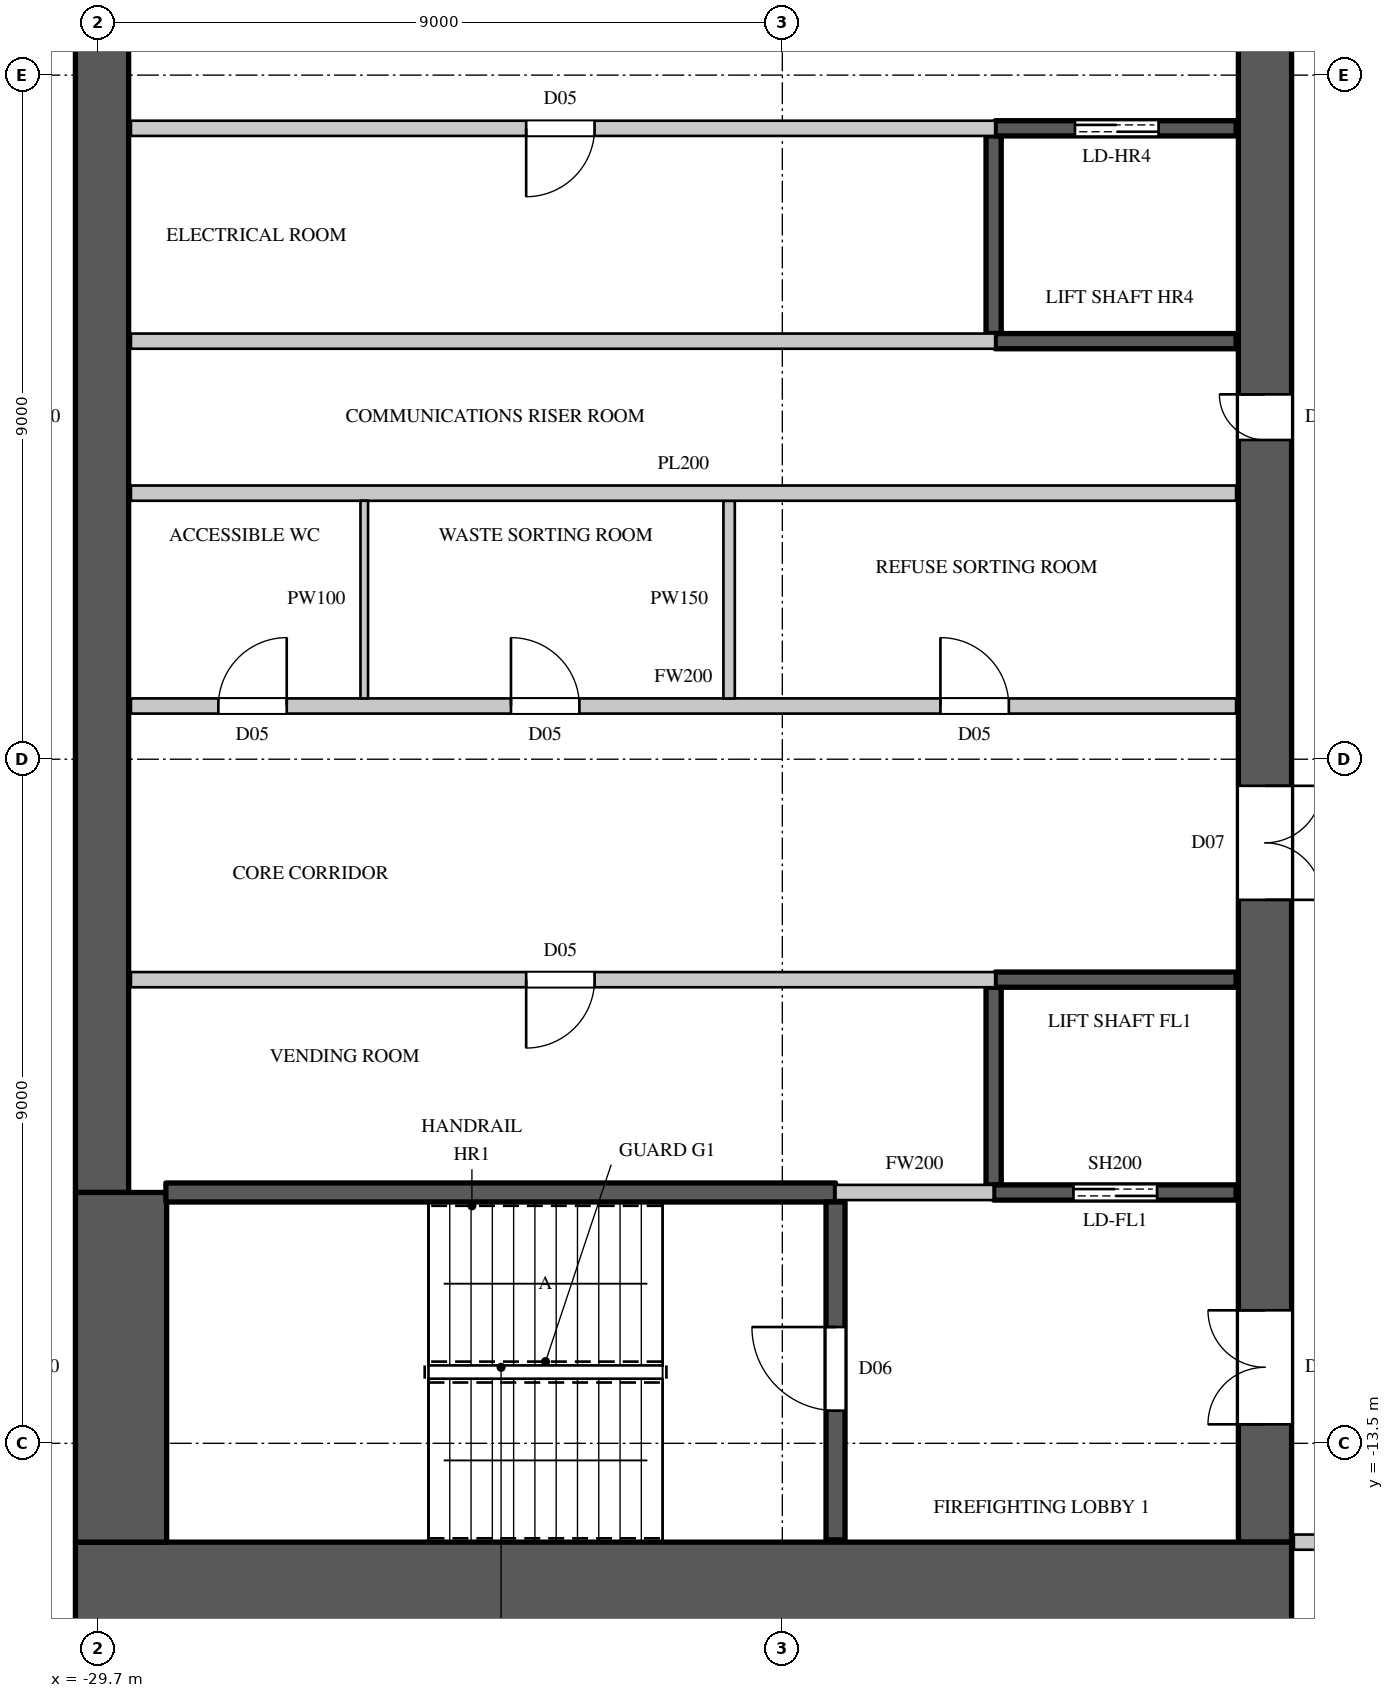
"""IFC4 building model, lengths in metres.
Left out: names, types, materials, properties, quantities, classifications, styles, units other than length and angle.
Written with IfcOpenShell. Run it as: python <this file> out.ifc"""

import sys

from ifc_helpers import new_model, si_unit, direction, frame, frame_2d, origin, place, context, subcontext, project, spatial, rectangle, extrude, element, fill, save


model = new_model("IFC4")
c1 = context("Model", 3, precision=1e-05, world=origin(), true_north=direction((0.0, 1.0)))
c2 = subcontext(c1, "Body", "Model", "MODEL_VIEW")
j1 = project(units=[si_unit("LENGTHUNIT", "METRE"), si_unit("PLANEANGLEUNIT", "RADIAN")], contexts=[c1])
p1 = place(None, origin())
s1 = spatial("IfcSite", under=j1, at=p1, CompositionType="ELEMENT")
p2 = place(p1, origin())
s2 = spatial("IfcBuilding", under=s1, at=p2, CompositionType="ELEMENT")
p3 = place(p2, frame((0.0, 0.0, 288.5)))
s3 = spatial("IfcBuildingStorey", under=s2, at=p3, CompositionType="ELEMENT", Elevation=288.5)
p4 = place(p3, frame((-30.0, -15.4, 0.0), z_axis=(0.0, 0.0, 1.0), x_axis=(1.0, 0.0, 0.0)))
e1 = element("IfcWall", 1, at=p4, inside=s3, PredefinedType="SHEAR", context=c2, shape_type="SweptSolid", body=[
    extrude(rectangle(XDim=16.0, YDim=1.2, at=frame_2d((8.0, 0.0))), origin(), (0.0, 0.0, 1.0), 4.1),
])
p5 = place(p3, frame((-14.35, -14.8, 0.0), z_axis=(0.0, 0.0, 1.0), x_axis=(0.0, 1.0, 0.0)))
e2 = element("IfcWall", 2, at=p5, inside=s3, PredefinedType="SHEAR", context=c2, shape_type="SweptSolid", body=[
    extrude(rectangle(XDim=29.6, YDim=0.7, at=frame_2d((14.8, 0.0))), origin(), (0.0, 0.0, 1.0), 4.1),
])
p6 = place(p5, frame((1.55, 0.0, 0.0)))
e3 = element("IfcOpeningElement", 3, at=p6, cuts=e2, PredefinedType="OPENING", context=c2, shape_type="SweptSolid", body=[
    extrude(rectangle(XDim=1.5, YDim=2.4, at=frame_2d((0.75, 1.2))), frame((0.0, 0.36, 0.0), z_axis=(0.0, -1.0, 0.0), x_axis=(1.0, 0.0, 0.0)), (0.0, 0.0, 1.0), 0.72),
])
p7 = place(p5, frame((26.55, 0.0, 0.0)))
e4 = element("IfcOpeningElement", 4, at=p7, cuts=e2, PredefinedType="OPENING", context=c2, shape_type="SweptSolid", body=[
    extrude(rectangle(XDim=1.5, YDim=2.4, at=frame_2d((0.75, 1.2))), frame((0.0, 0.36, 0.0), z_axis=(0.0, -1.0, 0.0), x_axis=(1.0, 0.0, 0.0)), (0.0, 0.0, 1.0), 0.72),
])
p8 = place(p5, frame((8.45, 0.0, 0.0)))
e5 = element("IfcOpeningElement", 5, at=p8, cuts=e2, PredefinedType="OPENING", context=c2, shape_type="SweptSolid", body=[
    extrude(rectangle(XDim=1.5, YDim=2.4, at=frame_2d((0.75, 1.2))), frame((0.0, 0.36, 0.0), z_axis=(0.0, -1.0, 0.0), x_axis=(1.0, 0.0, 0.0)), (0.0, 0.0, 1.0), 0.72),
])
p9 = place(p5, frame((19.65, 0.0, 0.0)))
e6 = element("IfcOpeningElement", 6, at=p9, cuts=e2, PredefinedType="OPENING", context=c2, shape_type="SweptSolid", body=[
    extrude(rectangle(XDim=1.5, YDim=2.4, at=frame_2d((0.75, 1.2))), frame((0.0, 0.36, 0.0), z_axis=(0.0, -1.0, 0.0), x_axis=(1.0, 0.0, 0.0)), (0.0, 0.0, 1.0), 0.72),
])
p10 = place(p5, frame((14.5, 0.0, 0.0)))
e7 = element("IfcOpeningElement", 7, at=p10, cuts=e2, PredefinedType="OPENING", context=c2, shape_type="SweptSolid", body=[
    extrude(rectangle(XDim=0.6, YDim=2.0, at=frame_2d((0.3, 1.0))), frame((0.0, 0.36, 0.0), z_axis=(0.0, -1.0, 0.0), x_axis=(1.0, 0.0, 0.0)), (0.0, 0.0, 1.0), 0.72),
])
p11 = place(p3, frame((-29.65, -10.2, 0.0), z_axis=(0.0, 0.0, 1.0), x_axis=(0.0, 1.0, 0.0)))
e8 = element("IfcWall", 8, at=p11, inside=s3, PredefinedType="SHEAR", context=c2, shape_type="SweptSolid", body=[
    extrude(rectangle(XDim=20.4, YDim=0.7, at=frame_2d((10.2, 0.0))), origin(), (0.0, 0.0, 1.0), 4.1),
])
p12 = place(p3, frame((-29.4, -14.8, 0.0), z_axis=(0.0, 0.0, 1.0), x_axis=(0.0, 1.0, 0.0)))
e9 = element("IfcWall", 9, at=p12, inside=s3, PredefinedType="SHEAR", context=c2, shape_type="SweptSolid", body=[
    extrude(rectangle(XDim=4.6, YDim=1.2, at=frame_2d((2.3, 0.0))), origin(), (0.0, 0.0, 1.0), 4.1),
])
p13 = place(p3, frame((-29.27, -7.4, 0.0), z_axis=(0.0, 0.0, 1.0), x_axis=(1.0, 0.0, 0.0)))
e10 = element("IfcWall", 10, at=p13, inside=s3, PredefinedType="PARTITIONING", context=c2, shape_type="SweptSolid", body=[
    extrude(rectangle(XDim=11.37, YDim=0.2, at=frame_2d((5.685, 0.0))), origin(), (0.0, 0.0, 1.0), 3.8),
])
p14 = place(p13, frame((5.2, 0.0, 0.0)))
e11 = element("IfcOpeningElement", 11, at=p14, cuts=e10, PredefinedType="OPENING", context=c2, shape_type="SweptSolid", body=[
    extrude(rectangle(XDim=0.9, YDim=2.2, at=frame_2d((0.45, 1.1))), frame((0.0, 0.11, 0.0), z_axis=(0.0, -1.0, 0.0), x_axis=(1.0, 0.0, 0.0)), (0.0, 0.0, 1.0), 0.22),
])
p15 = place(p3, frame((-29.27, -3.8, 0.0), z_axis=(0.0, 0.0, 1.0), x_axis=(1.0, 0.0, 0.0)))
e12 = element("IfcWall", 12, at=p15, inside=s3, PredefinedType="PARTITIONING", context=c2, shape_type="SweptSolid", body=[
    extrude(rectangle(XDim=14.54, YDim=0.2, at=frame_2d((7.27, 0.0))), origin(), (0.0, 0.0, 1.0), 3.8),
])
p16 = place(p15, frame((1.15, 0.0, 0.0)))
e13 = element("IfcOpeningElement", 13, at=p16, cuts=e12, PredefinedType="OPENING", context=c2, shape_type="SweptSolid", body=[
    extrude(rectangle(XDim=0.9, YDim=2.2, at=frame_2d((0.45, 1.1))), frame((0.0, 0.11, 0.0), z_axis=(0.0, -1.0, 0.0), x_axis=(1.0, 0.0, 0.0)), (0.0, 0.0, 1.0), 0.22),
])
p17 = place(p15, frame((5.0, 0.0, 0.0)))
e14 = element("IfcOpeningElement", 14, at=p17, cuts=e12, PredefinedType="OPENING", context=c2, shape_type="SweptSolid", body=[
    extrude(rectangle(XDim=0.9, YDim=2.2, at=frame_2d((0.45, 1.1))), frame((0.0, 0.11, 0.0), z_axis=(0.0, -1.0, 0.0), x_axis=(1.0, 0.0, 0.0)), (0.0, 0.0, 1.0), 0.22),
])
p18 = place(p15, frame((10.65, 0.0, 0.0)))
e15 = element("IfcOpeningElement", 15, at=p18, cuts=e12, PredefinedType="OPENING", context=c2, shape_type="SweptSolid", body=[
    extrude(rectangle(XDim=0.9, YDim=2.2, at=frame_2d((0.45, 1.1))), frame((0.0, 0.11, 0.0), z_axis=(0.0, -1.0, 0.0), x_axis=(1.0, 0.0, 0.0)), (0.0, 0.0, 1.0), 0.22),
])
p19 = place(p3, frame((-20.0, -10.2, 0.0), z_axis=(0.0, 0.0, 1.0), x_axis=(1.0, 0.0, 0.0)))
e16 = element("IfcWall", 16, at=p19, inside=s3, PredefinedType="PARTITIONING", context=c2, shape_type="SweptSolid", body=[
    extrude(rectangle(XDim=2.08, YDim=0.2, at=frame_2d((1.04, 0.0))), origin(), (0.0, 0.0, 1.0), 3.8),
])
p20 = place(p3, frame((-13.97, -14.8, 0.0), z_axis=(0.0, 0.0, 1.0), x_axis=(1.0, 0.0, 0.0)))
e17 = element("IfcWall", 17, at=p20, inside=s3, PredefinedType="PARTITIONING", context=c2, shape_type="SweptSolid", body=[
    extrude(rectangle(XDim=2.87, YDim=0.2, at=frame_2d((1.435, 0.0))), origin(), (0.0, 0.0, 1.0), 3.8),
])
p21 = place(p3, frame((-21.4, -3.7, 0.0), z_axis=(0.0, 0.0, 1.0), x_axis=(0.0, 1.0, 0.0)))
e18 = element("IfcWall", 18, at=p21, inside=s3, PredefinedType="PARTITIONING", context=c2, shape_type="SweptSolid", body=[
    extrude(rectangle(XDim=2.6, YDim=0.15, at=frame_2d((1.3, 0.0))), origin(), (0.0, 0.0, 1.0), 3.8),
])
p22 = place(p3, frame((-29.27, -1.0, 0.0), z_axis=(0.0, 0.0, 1.0), x_axis=(1.0, 0.0, 0.0)))
e19 = element("IfcWall", 19, at=p22, inside=s3, PredefinedType="PARTITIONING", context=c2, shape_type="SweptSolid", body=[
    extrude(rectangle(XDim=14.54, YDim=0.2, at=frame_2d((7.27, 0.0))), origin(), (0.0, 0.0, 1.0), 3.8),
])
p23 = place(p3, frame((-29.27, 1.0, 0.0), z_axis=(0.0, 0.0, 1.0), x_axis=(1.0, 0.0, 0.0)))
e20 = element("IfcWall", 20, at=p23, inside=s3, PredefinedType="PARTITIONING", context=c2, shape_type="SweptSolid", body=[
    extrude(rectangle(XDim=11.37, YDim=0.2, at=frame_2d((5.685, 0.0))), origin(), (0.0, 0.0, 1.0), 3.8),
])
p24 = place(p3, frame((-29.27, 3.8, 0.0), z_axis=(0.0, 0.0, 1.0), x_axis=(1.0, 0.0, 0.0)))
e21 = element("IfcWall", 21, at=p24, inside=s3, PredefinedType="PARTITIONING", context=c2, shape_type="SweptSolid", body=[
    extrude(rectangle(XDim=11.37, YDim=0.2, at=frame_2d((5.685, 0.0))), origin(), (0.0, 0.0, 1.0), 3.8),
])
p25 = place(p24, frame((5.2, 0.0, 0.0)))
e22 = element("IfcOpeningElement", 22, at=p25, cuts=e21, PredefinedType="OPENING", context=c2, shape_type="SweptSolid", body=[
    extrude(rectangle(XDim=0.9, YDim=2.2, at=frame_2d((0.45, 1.1))), frame((0.0, 0.11, 0.0), z_axis=(0.0, -1.0, 0.0), x_axis=(1.0, 0.0, 0.0)), (0.0, 0.0, 1.0), 0.22),
])
p26 = place(p3, frame((-17.92, -10.1, 0.0), z_axis=(0.0, 0.0, 1.0), x_axis=(0.0, 1.0, 0.0)))
e23 = element("IfcWall", 23, at=p26, inside=s3, PredefinedType="SHEAR", context=c2, shape_type="SweptSolid", body=[
    extrude(rectangle(XDim=2.6, YDim=0.2, at=frame_2d((1.3, 0.0))), origin(), (0.0, 0.0, 1.0), 3.8),
])
p27 = place(p3, frame((-17.92, -10.2, 0.0), z_axis=(0.0, 0.0, 1.0), x_axis=(1.0, 0.0, 0.0)))
e24 = element("IfcWall", 24, at=p27, inside=s3, PredefinedType="SHEAR", context=c2, shape_type="SweptSolid", body=[
    extrude(rectangle(XDim=3.19, YDim=0.2, at=frame_2d((1.595, 0.0))), origin(), (0.0, 0.0, 1.0), 3.8),
])
p28 = place(p27, frame((1.05, 0.0, 0.0)))
e25 = element("IfcOpeningElement", 25, at=p28, cuts=e24, PredefinedType="OPENING", context=c2, shape_type="SweptSolid", body=[
    extrude(rectangle(XDim=1.1, YDim=2.2, at=frame_2d((0.55, 1.1))), frame((0.0, 0.11, 0.0), z_axis=(0.0, -1.0, 0.0), x_axis=(1.0, 0.0, 0.0)), (0.0, 0.0, 1.0), 0.22),
])
p29 = place(p3, frame((-17.9, -7.4, 0.0), z_axis=(0.0, 0.0, 1.0), x_axis=(1.0, 0.0, 0.0)))
e26 = element("IfcWall", 26, at=p29, inside=s3, PredefinedType="SHEAR", context=c2, shape_type="SweptSolid", body=[
    extrude(rectangle(XDim=3.17, YDim=0.2, at=frame_2d((1.585, 0.0))), origin(), (0.0, 0.0, 1.0), 3.8),
])
p30 = place(p3, frame((-17.92, 1.1, 0.0), z_axis=(0.0, 0.0, 1.0), x_axis=(0.0, 1.0, 0.0)))
e27 = element("IfcWall", 27, at=p30, inside=s3, PredefinedType="SHEAR", context=c2, shape_type="SweptSolid", body=[
    extrude(rectangle(XDim=2.6, YDim=0.2, at=frame_2d((1.3, 0.0))), origin(), (0.0, 0.0, 1.0), 3.8),
])
p31 = place(p3, frame((-17.9, 1.0, 0.0), z_axis=(0.0, 0.0, 1.0), x_axis=(1.0, 0.0, 0.0)))
e28 = element("IfcWall", 28, at=p31, inside=s3, PredefinedType="SHEAR", context=c2, shape_type="SweptSolid", body=[
    extrude(rectangle(XDim=3.17, YDim=0.2, at=frame_2d((1.585, 0.0))), origin(), (0.0, 0.0, 1.0), 3.8),
])
p32 = place(p3, frame((-17.9, 3.8, 0.0), z_axis=(0.0, 0.0, 1.0), x_axis=(1.0, 0.0, 0.0)))
e29 = element("IfcWall", 29, at=p32, inside=s3, PredefinedType="SHEAR", context=c2, shape_type="SweptSolid", body=[
    extrude(rectangle(XDim=3.17, YDim=0.2, at=frame_2d((1.585, 0.0))), origin(), (0.0, 0.0, 1.0), 3.8),
])
p33 = place(p32, frame((1.05, 0.0, 0.0)))
e30 = element("IfcOpeningElement", 30, at=p33, cuts=e29, PredefinedType="OPENING", context=c2, shape_type="SweptSolid", body=[
    extrude(rectangle(XDim=1.1, YDim=2.2, at=frame_2d((0.55, 1.1))), frame((0.0, 0.11, 0.0), z_axis=(0.0, -1.0, 0.0), x_axis=(1.0, 0.0, 0.0)), (0.0, 0.0, 1.0), 0.22),
])
p34 = place(p3, frame((-28.81, -10.2, 0.0), z_axis=(0.0, 0.0, 1.0), x_axis=(1.0, 0.0, 0.0)))
e31 = element("IfcWall", 31, at=p34, inside=s3, PredefinedType="SHEAR", context=c2, shape_type="SweptSolid", body=[
    extrude(rectangle(XDim=8.81, YDim=0.25, at=frame_2d((4.405, 0.0))), origin(), (0.0, 0.0, 1.0), 3.8),
])
p35 = place(p3, frame((-20.0, -14.77, 0.0), z_axis=(0.0, 0.0, 1.0), x_axis=(0.0, 1.0, 0.0)))
e32 = element("IfcWall", 32, at=p35, inside=s3, PredefinedType="SHEAR", context=c2, shape_type="SweptSolid", body=[
    extrude(rectangle(XDim=4.445, YDim=0.25, at=frame_2d((2.223, 0.0))), origin(), (0.0, 0.0, 1.0), 3.8),
])
p36 = place(p35, frame((1.7, 0.0, 0.0)))
e33 = element("IfcOpeningElement", 33, at=p36, cuts=e32, PredefinedType="OPENING", context=c2, shape_type="SweptSolid", body=[
    extrude(rectangle(XDim=1.1, YDim=2.2, at=frame_2d((0.55, 1.1))), frame((0.0, 0.135, 0.0), z_axis=(0.0, -1.0, 0.0), x_axis=(1.0, 0.0, 0.0)), (0.0, 0.0, 1.0), 0.27),
])
p37 = place(p3, frame((-26.2, -3.7, 0.0), z_axis=(0.0, 0.0, 1.0), x_axis=(0.0, 1.0, 0.0)))
e34 = element("IfcWall", 34, at=p37, inside=s3, PredefinedType="PARTITIONING", context=c2, shape_type="SweptSolid", body=[
    extrude(rectangle(XDim=2.6, YDim=0.1, at=frame_2d((1.3, 0.0))), origin(), (0.0, 0.0, 1.0), 3.8),
])
p38 = place(p36, origin())
e35 = element("IfcDoor", 35, at=p38, inside=s3, OperationType="SINGLE_SWING_RIGHT", PredefinedType="DOOR", context=c2, shape_type="SweptSolid", body=[
    extrude(rectangle(XDim=1.1, YDim=2.2, at=frame_2d((0.55, 1.1))), frame((0.0, 0.025, 0.0), z_axis=(0.0, -1.0, 0.0), x_axis=(1.0, 0.0, 0.0)), (0.0, 0.0, 1.0), 0.05),
])
fill(e33, e35)
p39 = place(p14, origin())
e36 = element("IfcDoor", 36, at=p39, inside=s3, OperationType="SINGLE_SWING_RIGHT", PredefinedType="DOOR", context=c2, shape_type="SweptSolid", body=[
    extrude(rectangle(XDim=0.9, YDim=2.2, at=frame_2d((0.45, 1.1))), frame((0.0, 0.025, 0.0), z_axis=(0.0, -1.0, 0.0), x_axis=(1.0, 0.0, 0.0)), (0.0, 0.0, 1.0), 0.05),
])
fill(e11, e36)
p40 = place(p16, origin())
e37 = element("IfcDoor", 37, at=p40, inside=s3, OperationType="SINGLE_SWING_RIGHT", PredefinedType="DOOR", context=c2, shape_type="SweptSolid", body=[
    extrude(rectangle(XDim=0.9, YDim=2.2, at=frame_2d((0.45, 1.1))), frame((0.0, 0.025, 0.0), z_axis=(0.0, -1.0, 0.0), x_axis=(1.0, 0.0, 0.0)), (0.0, 0.0, 1.0), 0.05),
])
fill(e13, e37)
p41 = place(p17, origin())
e38 = element("IfcDoor", 38, at=p41, inside=s3, OperationType="SINGLE_SWING_LEFT", PredefinedType="DOOR", context=c2, shape_type="SweptSolid", body=[
    extrude(rectangle(XDim=0.9, YDim=2.2, at=frame_2d((0.45, 1.1))), frame((0.0, 0.025, 0.0), z_axis=(0.0, -1.0, 0.0), x_axis=(1.0, 0.0, 0.0)), (0.0, 0.0, 1.0), 0.05),
])
fill(e14, e38)
p42 = place(p18, origin())
e39 = element("IfcDoor", 39, at=p42, inside=s3, OperationType="SINGLE_SWING_LEFT", PredefinedType="DOOR", context=c2, shape_type="SweptSolid", body=[
    extrude(rectangle(XDim=0.9, YDim=2.2, at=frame_2d((0.45, 1.1))), frame((0.0, 0.025, 0.0), z_axis=(0.0, -1.0, 0.0), x_axis=(1.0, 0.0, 0.0)), (0.0, 0.0, 1.0), 0.05),
])
fill(e15, e39)
p43 = place(p25, origin())
e40 = element("IfcDoor", 40, at=p43, inside=s3, OperationType="SINGLE_SWING_RIGHT", PredefinedType="DOOR", context=c2, shape_type="SweptSolid", body=[
    extrude(rectangle(XDim=0.9, YDim=2.2, at=frame_2d((0.45, 1.1))), frame((0.0, 0.025, 0.0), z_axis=(0.0, -1.0, 0.0), x_axis=(1.0, 0.0, 0.0)), (0.0, 0.0, 1.0), 0.05),
])
fill(e22, e40)
p44 = place(p28, origin())
e41 = element("IfcDoor", 41, at=p44, inside=s3, OperationType="DOUBLE_DOOR_SLIDING", PredefinedType="DOOR", context=c2, shape_type="SweptSolid", body=[
    extrude(rectangle(XDim=1.1, YDim=2.2, at=frame_2d((0.55, 1.1))), frame((0.0, 0.025, 0.0), z_axis=(0.0, -1.0, 0.0), x_axis=(1.0, 0.0, 0.0)), (0.0, 0.0, 1.0), 0.05),
])
fill(e25, e41)
p45 = place(p33, origin())
e42 = element("IfcDoor", 42, at=p45, inside=s3, OperationType="DOUBLE_DOOR_SLIDING", PredefinedType="DOOR", context=c2, shape_type="SweptSolid", body=[
    extrude(rectangle(XDim=1.1, YDim=2.2, at=frame_2d((0.55, 1.1))), frame((0.0, 0.025, 0.0), z_axis=(0.0, -1.0, 0.0), x_axis=(1.0, 0.0, 0.0)), (0.0, 0.0, 1.0), 0.05),
])
fill(e30, e42)
p46 = place(p6, origin())
e43 = element("IfcDoor", 43, at=p46, inside=s3, OperationType="DOUBLE_DOOR_SINGLE_SWING", PredefinedType="DOOR", context=c2, shape_type="SweptSolid", body=[
    extrude(rectangle(XDim=1.5, YDim=2.4, at=frame_2d((0.75, 1.2))), frame((0.0, 0.345, 0.0), z_axis=(0.0, -1.0, 0.0), x_axis=(1.0, 0.0, 0.0)), (0.0, 0.0, 1.0), 0.05),
])
fill(e3, e43)
p47 = place(p8, origin())
e44 = element("IfcDoor", 44, at=p47, inside=s3, OperationType="DOUBLE_DOOR_SINGLE_SWING", PredefinedType="DOOR", context=c2, shape_type="SweptSolid", body=[
    extrude(rectangle(XDim=1.5, YDim=2.4, at=frame_2d((0.75, 1.2))), frame((0.0, -0.295, 0.0), z_axis=(0.0, -1.0, 0.0), x_axis=(1.0, 0.0, 0.0)), (0.0, 0.0, 1.0), 0.05),
])
fill(e5, e44)
p48 = place(p10, origin())
e45 = element("IfcDoor", 45, at=p48, inside=s3, OperationType="SINGLE_SWING_RIGHT", PredefinedType="DOOR", context=c2, shape_type="SweptSolid", body=[
    extrude(rectangle(XDim=0.6, YDim=2.0, at=frame_2d((0.3, 1.0))), frame((0.0, 0.345, 0.0), z_axis=(0.0, -1.0, 0.0), x_axis=(1.0, 0.0, 0.0)), (0.0, 0.0, 1.0), 0.05),
])
fill(e7, e45)
save(model, sys.argv[1])
